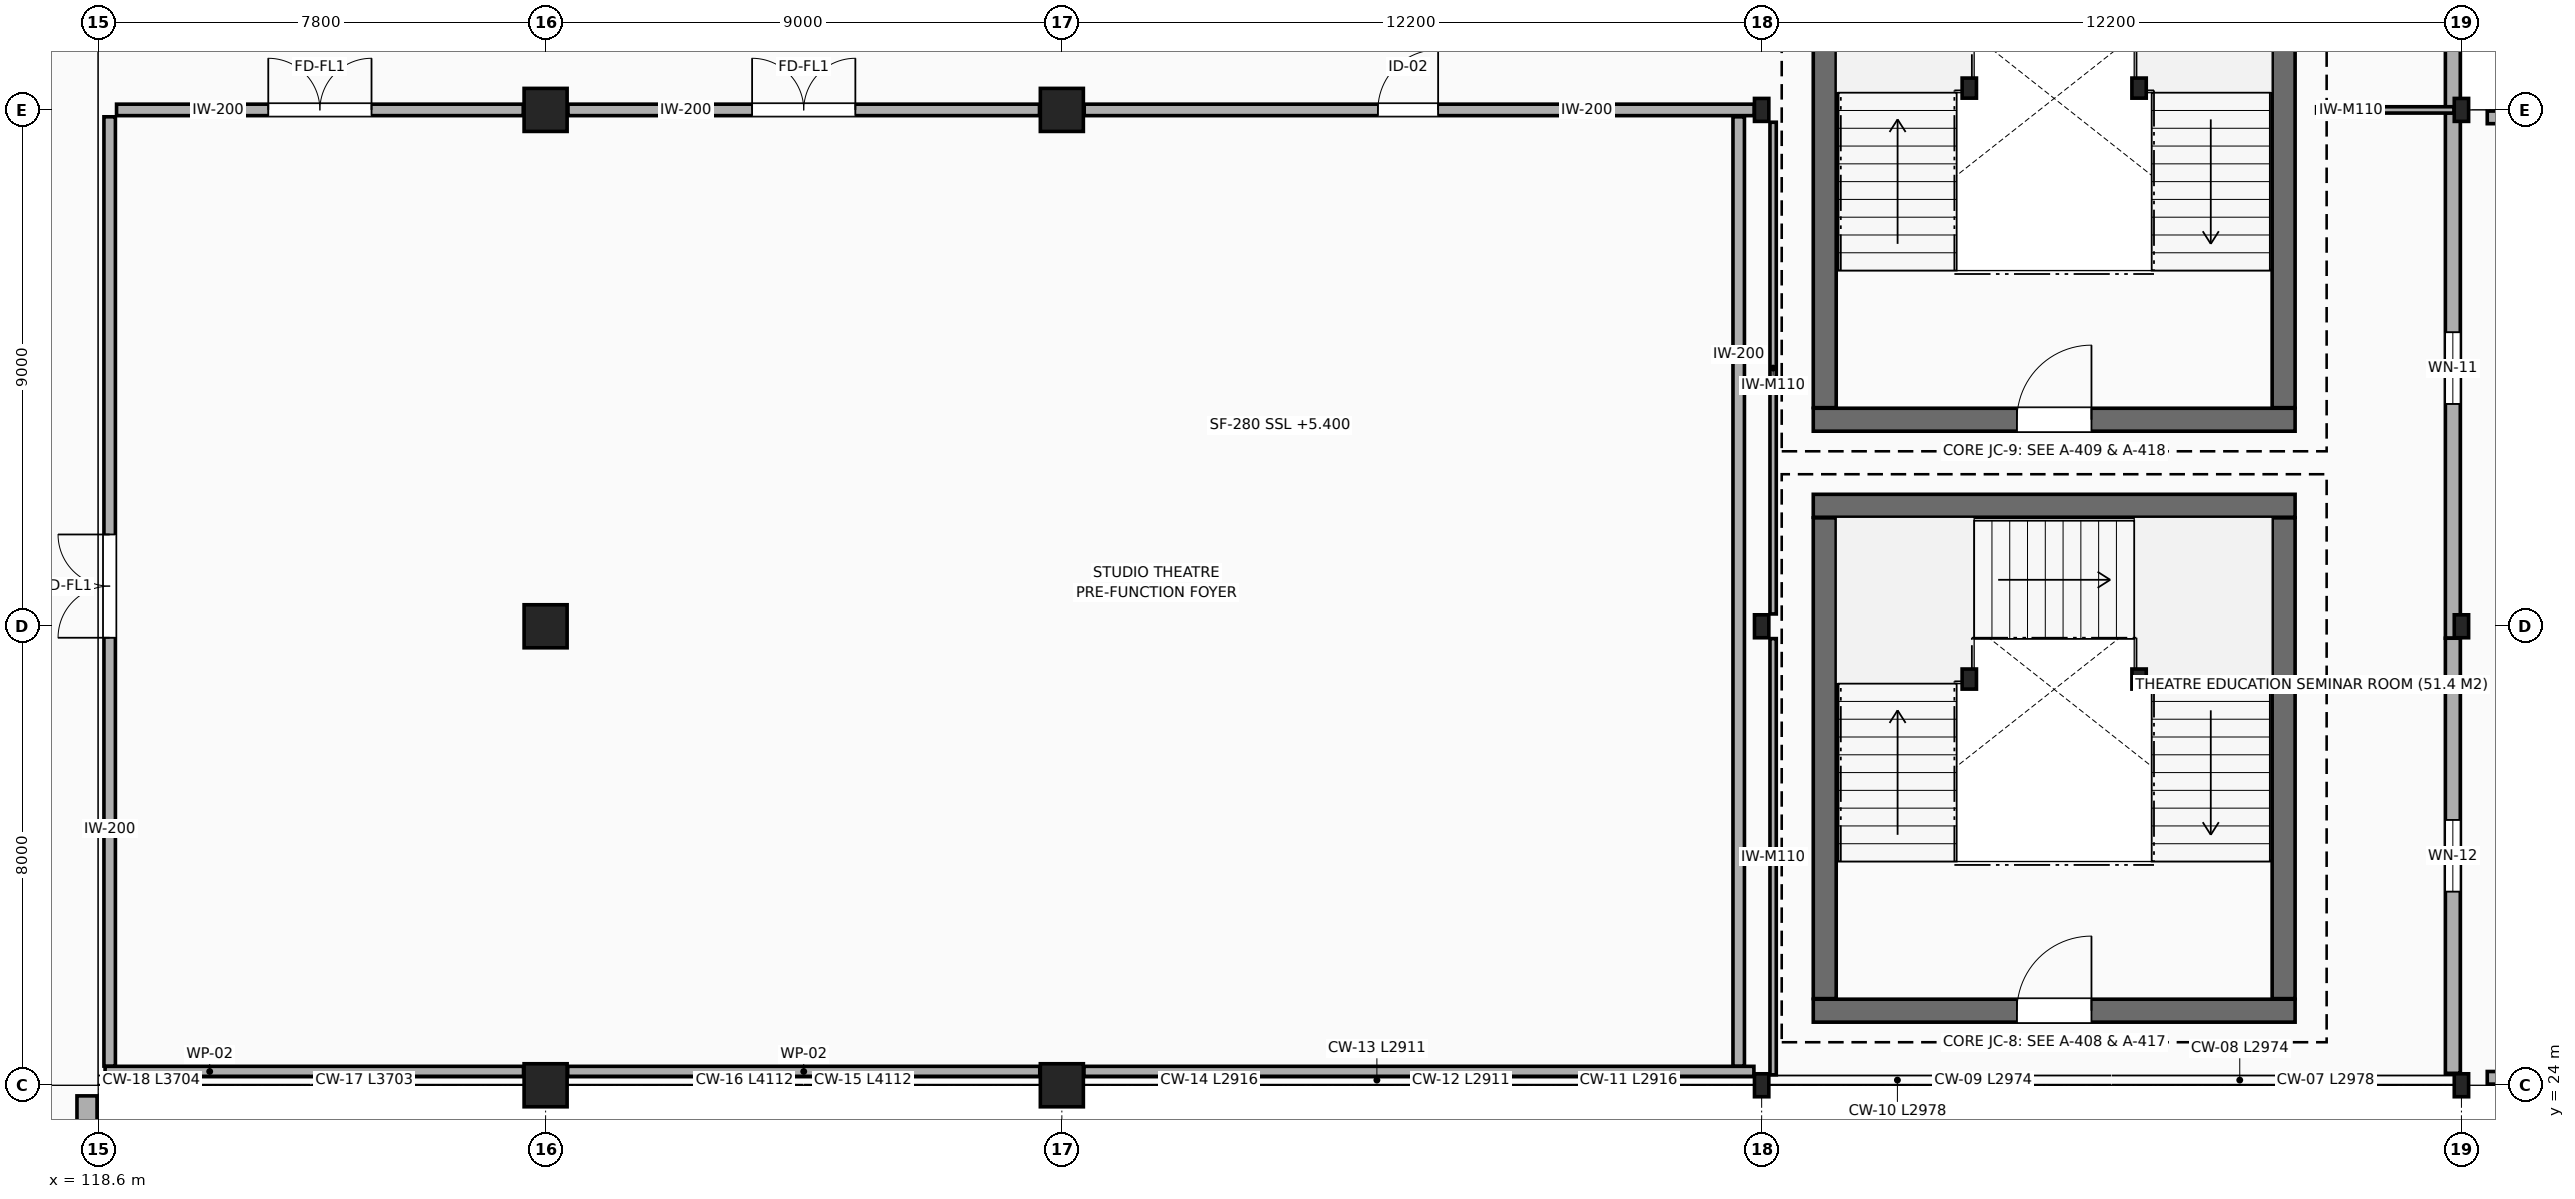
"""IFC4 building model, lengths in metres.
Left out: names, types, materials, properties, quantities, classifications, styles, units other than length and angle.
Written with IfcOpenShell. Run it as: python <this file> out.ifc"""

import sys

from ifc_helpers import new_model, si_unit, direction, frame, frame_2d, origin, origin_2d, place, context, subcontext, project, spatial, rectangle, i_section, extrude, element, fill, save


model = new_model("IFC4")
c1 = context("Model", 3, precision=1e-05, world=origin(), true_north=direction((0.0, 1.0)))
c2 = subcontext(c1, "Body", "Model", "MODEL_VIEW")
j1 = project(units=[si_unit("LENGTHUNIT", "METRE"), si_unit("PLANEANGLEUNIT", "RADIAN")], contexts=[c1])
p1 = place(None, origin())
s1 = spatial("IfcSite", under=j1, at=p1, CompositionType="ELEMENT")
p2 = place(p1, origin())
s2 = spatial("IfcBuilding", under=s1, at=p2, CompositionType="ELEMENT")
p3 = place(p2, frame((0.0, 0.0, 5.4)))
s3 = spatial("IfcBuildingStorey", under=s2, at=p3, CompositionType="ELEMENT", Elevation=5.4)
for number, where, z_axis, x_axis in (
    (1, (126.4, 24.0, 0.0), (0.0, 0.0, 1.0), (1.0, 0.0, 0.0)),
    (2, (126.4, 32.0, 0.0), (0.0, 0.0, 1.0), (1.0, 0.0, 0.0)),
    (3, (126.4, 41.0, 0.0), (0.0, 0.0, 1.0), (1.0, 0.0, 0.0)),
    (4, (135.4, 24.0, 0.0), (0.0, 0.0, 1.0), (1.0, 0.0, 0.0)),
    (5, (135.4, 41.0, 0.0), (0.0, 0.0, 1.0), (1.0, 0.0, 0.0)),
):
    element("IfcColumn", number, at=place(p3, frame(where, z_axis=z_axis, x_axis=x_axis)), inside=s3, PredefinedType="COLUMN", context=c2, shape_type="SweptSolid", body=[
        extrude(rectangle(XDim=0.75, YDim=0.75, at=origin_2d()), origin(), (0.0, 0.0, 1.0), 4.8),
    ])
for number, where, z_axis, x_axis in (
    (6, (147.6, 24.0, 0.0), (0.0, 0.0, 1.0), (1.0, 0.0, 0.0)),
    (7, (147.6, 32.0, 0.0), (0.0, 0.0, 1.0), (1.0, 0.0, 0.0)),
    (8, (147.6, 41.0, 0.0), (0.0, 0.0, 1.0), (1.0, 0.0, 0.0)),
    (9, (159.8, 24.0, 0.0), (0.0, 0.0, 1.0), (1.0, 0.0, 0.0)),
    (10, (159.8, 32.0, 0.0), (0.0, 0.0, 1.0), (1.0, 0.0, 0.0)),
    (11, (159.8, 41.0, 0.0), (0.0, 0.0, 1.0), (1.0, 0.0, 0.0)),
):
    element("IfcColumn", number, at=place(p3, frame(where, z_axis=z_axis, x_axis=x_axis)), inside=s3, PredefinedType="COLUMN", context=c2, shape_type="SweptSolid", body=[
        extrude(i_section(OverallWidth=0.25, OverallDepth=0.4, WebThickness=0.01, FlangeThickness=0.013, FilletRadius=0.014, at=origin_2d()), origin(), (0.0, 0.0, 1.0), 4.8),
    ])
for number, where, z_axis, x_axis in (
    (12, (151.22, 31.08, 0.0), (0.0, 0.0, 1.0), (1.0, 0.0, 0.0)),
    (13, (154.18, 31.08, 0.0), (0.0, 0.0, 1.0), (1.0, 0.0, 0.0)),
    (14, (151.22, 41.38, 0.0), (0.0, 0.0, 1.0), (1.0, 0.0, 0.0)),
    (15, (154.18, 41.38, 0.0), (0.0, 0.0, 1.0), (1.0, 0.0, 0.0)),
):
    element("IfcColumn", number, at=place(p3, frame(where, z_axis=z_axis, x_axis=x_axis)), inside=s3, PredefinedType="COLUMN", context=c2, shape_type="SweptSolid", body=[
        extrude(i_section(OverallWidth=0.25, OverallDepth=0.35, WebThickness=0.01, FlangeThickness=0.012, FilletRadius=0.012, at=origin_2d()), origin(), (0.0, 0.0, 1.0), 4.8),
    ])
p4 = place(p3, frame((159.65, 49.792, 0.0), z_axis=(0.0, 0.0, 1.0), x_axis=(0.0, -1.0, 0.0)))
e16 = element("IfcWall", 16, at=p4, inside=s3, PredefinedType="ELEMENTEDWALL", context=c2, shape_type="SweptSolid", body=[
    extrude(rectangle(XDim=8.74, YDim=0.26, at=frame_2d((4.37, 0.0))), origin(), (0.0, 0.0, 1.0), 3.975),
])
p5 = place(p4, frame((3.667, 0.0, 0.95)))
e17 = element("IfcOpeningElement", 17, at=p5, cuts=e16, PredefinedType="OPENING", context=c2, shape_type="SweptSolid", body=[
    extrude(rectangle(XDim=1.25, YDim=1.5, at=frame_2d((0.625, 0.75))), frame((0.0, 0.14, 0.0), z_axis=(0.0, -1.0, 0.0), x_axis=(1.0, 0.0, 0.0)), (0.0, 0.0, 1.0), 0.28),
])
p6 = place(p3, frame((159.65, 40.948, 0.0), z_axis=(0.0, 0.0, 1.0), x_axis=(0.0, -1.0, 0.0)))
e18 = element("IfcWall", 18, at=p6, inside=s3, PredefinedType="ELEMENTEDWALL", context=c2, shape_type="SweptSolid", body=[
    extrude(rectangle(XDim=9.156, YDim=0.26, at=frame_2d((4.578, 0.0))), origin(), (0.0, 0.0, 1.0), 3.925),
])
p7 = place(p6, frame((3.823, 0.0, 0.95)))
e19 = element("IfcOpeningElement", 19, at=p7, cuts=e18, PredefinedType="OPENING", context=c2, shape_type="SweptSolid", body=[
    extrude(rectangle(XDim=1.25, YDim=1.8, at=frame_2d((0.625, 0.9))), frame((0.0, 0.14, 0.0), z_axis=(0.0, -1.0, 0.0), x_axis=(1.0, 0.0, 0.0)), (0.0, 0.0, 1.0), 0.28),
])
p8 = place(p3, frame((159.65, 31.792, 0.0), z_axis=(0.0, 0.0, 1.0), x_axis=(0.0, -1.0, 0.0)))
e20 = element("IfcWall", 20, at=p8, inside=s3, PredefinedType="ELEMENTEDWALL", context=c2, shape_type="SweptSolid", body=[
    extrude(rectangle(XDim=7.584, YDim=0.26, at=frame_2d((3.792, 0.0))), origin(), (0.0, 0.0, 1.0), 4.225),
])
p9 = place(p8, frame((3.167, 0.0, 0.95)))
e21 = element("IfcOpeningElement", 21, at=p9, cuts=e20, PredefinedType="OPENING", context=c2, shape_type="SweptSolid", body=[
    extrude(rectangle(XDim=1.25, YDim=2.1, at=frame_2d((0.625, 1.05))), frame((0.0, 0.14, 0.0), z_axis=(0.0, -1.0, 0.0), x_axis=(1.0, 0.0, 0.0)), (0.0, 0.0, 1.0), 0.28),
])
p10 = place(p3, frame((147.465, 24.24, 0.0), z_axis=(0.0, 0.0, 1.0), x_axis=(-1.0, 0.0, 0.0)))
e22 = element("IfcWall", 22, at=p10, inside=s3, PredefinedType="PARAPET", context=c2, shape_type="SweptSolid", body=[
    extrude(rectangle(XDim=11.68, YDim=0.18, at=frame_2d((5.84, 0.0))), origin(), (0.0, 0.0, 1.0), 0.88),
])
p11 = place(p3, frame((135.015, 24.24, 0.0), z_axis=(0.0, 0.0, 1.0), x_axis=(-1.0, 0.0, 0.0)))
e23 = element("IfcWall", 23, at=p11, inside=s3, PredefinedType="PARAPET", context=c2, shape_type="SweptSolid", body=[
    extrude(rectangle(XDim=8.23, YDim=0.18, at=frame_2d((4.115, 0.0))), origin(), (0.0, 0.0, 1.0), 0.88),
])
p12 = place(p3, frame((126.015, 24.24, 0.0), z_axis=(0.0, 0.0, 1.0), x_axis=(-1.0, 0.0, 0.0)))
e24 = element("IfcWall", 24, at=p12, inside=s3, PredefinedType="PARAPET", context=c2, shape_type="SweptSolid", body=[
    extrude(rectangle(XDim=7.295, YDim=0.18, at=frame_2d((3.647, 0.0))), origin(), (0.0, 0.0, 1.0), 0.88),
])
p13 = place(p3, frame((118.405, 23.815, 0.0), z_axis=(0.0, 0.0, 1.0), x_axis=(0.0, -1.0, 0.0)))
e25 = element("IfcWall", 25, at=p13, inside=s3, PredefinedType="STANDARD", context=c2, shape_type="SweptSolid", body=[
    extrude(rectangle(XDim=13.63, YDim=0.35, at=frame_2d((6.815, 0.0))), origin(), (0.0, 0.0, 1.0), 3.725),
])
for number, where, z_axis, x_axis in (
    (26, (160.25, 40.87, 0.0), (0.0, 0.0, 1.0), (1.0, 0.0, 0.0)),
    (27, (171.85, 24.13, 0.0), (0.0, 0.0, 1.0), (-1.0, 0.0, 0.0)),
):
    element("IfcWall", number, at=place(p3, frame(where, z_axis=z_axis, x_axis=x_axis)), inside=s3, PredefinedType="PARAPET", context=c2, shape_type="SweptSolid", body=[
        extrude(rectangle(XDim=11.6, YDim=0.22, at=frame_2d((5.8, 0.0))), origin(), (0.0, 0.0, 1.0), 1.15),
    ])
p14 = place(p3, frame((148.5, 25.3, 0.0), z_axis=(0.0, 0.0, 1.0), x_axis=(1.0, 0.0, 0.0)))
e28 = element("IfcWall", 28, at=p14, inside=s3, PredefinedType="SHEAR", context=c2, shape_type="SweptSolid", body=[
    extrude(rectangle(XDim=8.4, YDim=0.4, at=frame_2d((4.2, 0.0))), origin(), (0.0, 0.0, 1.0), 4.54),
])
p15 = place(p14, frame((3.55, 0.0, 0.0)))
e29 = element("IfcOpeningElement", 29, at=p15, cuts=e28, PredefinedType="OPENING", context=c2, shape_type="SweptSolid", body=[
    extrude(rectangle(XDim=1.3, YDim=2.15, at=frame_2d((0.65, 1.075))), frame((0.0, 0.21, 0.0), z_axis=(0.0, -1.0, 0.0), x_axis=(1.0, 0.0, 0.0)), (0.0, 0.0, 1.0), 0.42),
])
p16 = place(p3, frame((156.9, 34.1, 0.0), z_axis=(0.0, 0.0, 1.0), x_axis=(-1.0, 0.0, 0.0)))
e30 = element("IfcWall", 30, at=p16, inside=s3, PredefinedType="SHEAR", context=c2, shape_type="SweptSolid", body=[
    extrude(rectangle(XDim=8.4, YDim=0.4, at=frame_2d((4.2, 0.0))), origin(), (0.0, 0.0, 1.0), 4.54),
])
for number, where, z_axis, x_axis in (
    (31, (156.7, 25.51, 0.0), (0.0, 0.0, 1.0), (0.0, 1.0, 0.0)),
    (32, (148.7, 33.89, 0.0), (0.0, 0.0, 1.0), (0.0, -1.0, 0.0)),
):
    element("IfcWall", number, at=place(p3, frame(where, z_axis=z_axis, x_axis=x_axis)), inside=s3, PredefinedType="SHEAR", context=c2, shape_type="SweptSolid", body=[
        extrude(rectangle(XDim=8.38, YDim=0.4, at=frame_2d((4.19, 0.0))), origin(), (0.0, 0.0, 1.0), 4.54),
    ])
p17 = place(p3, frame((148.5, 35.6, 0.0), z_axis=(0.0, 0.0, 1.0), x_axis=(1.0, 0.0, 0.0)))
e33 = element("IfcWall", 33, at=p17, inside=s3, PredefinedType="SHEAR", context=c2, shape_type="SweptSolid", body=[
    extrude(rectangle(XDim=8.4, YDim=0.4, at=frame_2d((4.2, 0.0))), origin(), (0.0, 0.0, 1.0), 4.54),
])
p18 = place(p17, frame((3.55, 0.0, 0.0)))
e34 = element("IfcOpeningElement", 34, at=p18, cuts=e33, PredefinedType="OPENING", context=c2, shape_type="SweptSolid", body=[
    extrude(rectangle(XDim=1.3, YDim=2.15, at=frame_2d((0.65, 1.075))), frame((0.0, 0.21, 0.0), z_axis=(0.0, -1.0, 0.0), x_axis=(1.0, 0.0, 0.0)), (0.0, 0.0, 1.0), 0.42),
])
for number, where, z_axis, x_axis in (
    (35, (156.7, 35.81, 0.0), (0.0, 0.0, 1.0), (0.0, 1.0, 0.0)),
    (36, (148.7, 44.19, 0.0), (0.0, 0.0, 1.0), (0.0, -1.0, 0.0)),
):
    element("IfcWall", number, at=place(p3, frame(where, z_axis=z_axis, x_axis=x_axis)), inside=s3, PredefinedType="SHEAR", context=c2, shape_type="SweptSolid", body=[
        extrude(rectangle(XDim=8.38, YDim=0.4, at=frame_2d((4.19, 0.0))), origin(), (0.0, 0.0, 1.0), 4.54),
    ])
p19 = place(p3, frame((118.92, 41.0, 0.0), z_axis=(0.0, 0.0, 1.0), x_axis=(1.0, 0.0, 0.0)))
e37 = element("IfcWall", 37, at=p19, inside=s3, PredefinedType="PARTITIONING", context=c2, shape_type="SweptSolid", body=[
    extrude(rectangle(XDim=7.09, YDim=0.2, at=frame_2d((3.545, 0.0))), origin(), (0.0, 0.0, 1.0), 4.53),
])
p20 = place(p19, frame((2.645, 0.0, 0.0)))
e38 = element("IfcOpeningElement", 38, at=p20, cuts=e37, PredefinedType="OPENING", context=c2, shape_type="SweptSolid", body=[
    extrude(rectangle(XDim=1.8, YDim=2.15, at=frame_2d((0.9, 1.075))), frame((0.0, 0.11, 0.0), z_axis=(0.0, -1.0, 0.0), x_axis=(1.0, 0.0, 0.0)), (0.0, 0.0, 1.0), 0.22),
])
p21 = place(p3, frame((126.79, 41.0, 0.0), z_axis=(0.0, 0.0, 1.0), x_axis=(1.0, 0.0, 0.0)))
e39 = element("IfcWall", 39, at=p21, inside=s3, PredefinedType="PARTITIONING", context=c2, shape_type="SweptSolid", body=[
    extrude(rectangle(XDim=8.22, YDim=0.2, at=frame_2d((4.11, 0.0))), origin(), (0.0, 0.0, 1.0), 3.89),
])
p22 = place(p21, frame((3.21, 0.0, 0.0)))
e40 = element("IfcOpeningElement", 40, at=p22, cuts=e39, PredefinedType="OPENING", context=c2, shape_type="SweptSolid", body=[
    extrude(rectangle(XDim=1.8, YDim=2.15, at=frame_2d((0.9, 1.075))), frame((0.0, 0.11, 0.0), z_axis=(0.0, -1.0, 0.0), x_axis=(1.0, 0.0, 0.0)), (0.0, 0.0, 1.0), 0.22),
])
p23 = place(p3, frame((135.79, 41.0, 0.0), z_axis=(0.0, 0.0, 1.0), x_axis=(1.0, 0.0, 0.0)))
e41 = element("IfcWall", 41, at=p23, inside=s3, PredefinedType="PARTITIONING", context=c2, shape_type="SweptSolid", body=[
    extrude(rectangle(XDim=11.681, YDim=0.2, at=frame_2d((5.84, 0.0))), origin(), (0.0, 0.0, 1.0), 3.89),
])
p24 = place(p23, frame((5.12, 0.0, 0.0)))
e42 = element("IfcOpeningElement", 42, at=p24, cuts=e41, PredefinedType="OPENING", context=c2, shape_type="SweptSolid", body=[
    extrude(rectangle(XDim=1.05, YDim=2.15, at=frame_2d((0.525, 1.075))), frame((0.0, 0.11, 0.0), z_axis=(0.0, -1.0, 0.0), x_axis=(1.0, 0.0, 0.0)), (0.0, 0.0, 1.0), 0.22),
])
p25 = place(p3, frame((147.2, 40.88, 0.0), z_axis=(0.0, 0.0, 1.0), x_axis=(0.0, -1.0, 0.0)))
e43 = element("IfcWall", 43, at=p25, inside=s3, PredefinedType="PARTITIONING", context=c2, shape_type="SweptSolid", body=[
    extrude(rectangle(XDim=16.546, YDim=0.2, at=frame_2d((8.273, 0.0))), origin(), (0.0, 0.0, 1.0), 3.89),
])
p26 = place(p3, frame((118.8, 24.334, 0.0), z_axis=(0.0, 0.0, 1.0), x_axis=(0.0, 1.0, 0.0)))
e44 = element("IfcWall", 44, at=p26, inside=s3, PredefinedType="PARTITIONING", context=c2, shape_type="SweptSolid", body=[
    extrude(rectangle(XDim=16.546, YDim=0.2, at=frame_2d((8.273, 0.0))), origin(), (0.0, 0.0, 1.0), 3.72),
])
p27 = place(p26, frame((7.466, 0.0, 0.0)))
e45 = element("IfcOpeningElement", 45, at=p27, cuts=e44, PredefinedType="OPENING", context=c2, shape_type="SweptSolid", body=[
    extrude(rectangle(XDim=1.8, YDim=2.15, at=frame_2d((0.9, 1.075))), frame((0.0, 0.11, 0.0), z_axis=(0.0, -1.0, 0.0), x_axis=(1.0, 0.0, 0.0)), (0.0, 0.0, 1.0), 0.22),
])
p28 = place(p3, frame((147.8, 24.182, 0.0), z_axis=(0.0, 0.0, 1.0), x_axis=(0.0, 1.0, 0.0)))
e46 = element("IfcWall", 46, at=p28, inside=s3, PredefinedType="MOVABLE", context=c2, shape_type="SweptSolid", body=[
    extrude(rectangle(XDim=7.603, YDim=0.11, at=frame_2d((3.802, 0.0))), origin(), (0.0, 0.0, 1.0), 3.89),
])
p29 = place(p3, frame((147.8, 32.215, 0.0), z_axis=(0.0, 0.0, 1.0), x_axis=(0.0, 1.0, 0.0)))
e47 = element("IfcWall", 47, at=p29, inside=s3, PredefinedType="MOVABLE", context=c2, shape_type="SweptSolid", body=[
    extrude(rectangle(XDim=8.57, YDim=0.11, at=frame_2d((4.285, 0.0))), origin(), (0.0, 0.0, 1.0), 3.89),
])
p30 = place(p3, frame((157.275, 41.0, 0.0), z_axis=(0.0, 0.0, 1.0), x_axis=(1.0, 0.0, 0.0)))
e48 = element("IfcWall", 48, at=p30, inside=s3, PredefinedType="MOVABLE", context=c2, shape_type="SweptSolid", body=[
    extrude(rectangle(XDim=2.396, YDim=0.11, at=frame_2d((1.198, 0.0))), origin(), (0.0, 0.0, 1.0), 4.53),
])
p31 = place(p7, origin())
e49 = element("IfcWindow", 49, at=p31, inside=s3, PartitioningType="SINGLE_PANEL", PredefinedType="WINDOW", context=c2, shape_type="SweptSolid", body=[
    extrude(rectangle(XDim=1.25, YDim=1.8, at=frame_2d((0.625, 0.9))), frame((0.0, 0.03, 0.0), z_axis=(0.0, -1.0, 0.0), x_axis=(1.0, 0.0, 0.0)), (0.0, 0.0, 1.0), 0.06),
])
fill(e19, e49)
p32 = place(p9, origin())
e50 = element("IfcWindow", 50, at=p32, inside=s3, PartitioningType="SINGLE_PANEL", PredefinedType="WINDOW", context=c2, shape_type="SweptSolid", body=[
    extrude(rectangle(XDim=1.25, YDim=2.1, at=frame_2d((0.625, 1.05))), frame((0.0, 0.03, 0.0), z_axis=(0.0, -1.0, 0.0), x_axis=(1.0, 0.0, 0.0)), (0.0, 0.0, 1.0), 0.06),
])
fill(e21, e50)
p33 = place(p15, origin())
e51 = element("IfcDoor", 51, at=p33, inside=s3, OperationType="SINGLE_SWING_RIGHT", PredefinedType="DOOR", context=c2, shape_type="SweptSolid", body=[
    extrude(rectangle(XDim=1.3, YDim=2.15, at=frame_2d((0.65, 1.075))), frame((0.0, 0.025, 0.0), z_axis=(0.0, -1.0, 0.0), x_axis=(1.0, 0.0, 0.0)), (0.0, 0.0, 1.0), 0.05),
])
fill(e29, e51)
p34 = place(p18, origin())
e52 = element("IfcDoor", 52, at=p34, inside=s3, OperationType="SINGLE_SWING_RIGHT", PredefinedType="DOOR", context=c2, shape_type="SweptSolid", body=[
    extrude(rectangle(XDim=1.3, YDim=2.15, at=frame_2d((0.65, 1.075))), frame((0.0, 0.025, 0.0), z_axis=(0.0, -1.0, 0.0), x_axis=(1.0, 0.0, 0.0)), (0.0, 0.0, 1.0), 0.05),
])
fill(e34, e52)
p35 = place(p24, origin())
e53 = element("IfcDoor", 53, at=p35, inside=s3, OperationType="SINGLE_SWING_RIGHT", PredefinedType="DOOR", context=c2, shape_type="SweptSolid", body=[
    extrude(rectangle(XDim=1.05, YDim=2.15, at=frame_2d((0.525, 1.075))), frame((0.0, 0.025, 0.0), z_axis=(0.0, -1.0, 0.0), x_axis=(1.0, 0.0, 0.0)), (0.0, 0.0, 1.0), 0.05),
])
fill(e42, e53)
p36 = place(p20, origin())
e54 = element("IfcDoor", 54, at=p36, inside=s3, OperationType="DOUBLE_DOOR_SINGLE_SWING", PredefinedType="DOOR", context=c2, shape_type="SweptSolid", body=[
    extrude(rectangle(XDim=1.8, YDim=2.15, at=frame_2d((0.9, 1.075))), frame((0.0, 0.025, 0.0), z_axis=(0.0, -1.0, 0.0), x_axis=(1.0, 0.0, 0.0)), (0.0, 0.0, 1.0), 0.05),
])
fill(e38, e54)
p37 = place(p22, origin())
e55 = element("IfcDoor", 55, at=p37, inside=s3, OperationType="DOUBLE_DOOR_SINGLE_SWING", PredefinedType="DOOR", context=c2, shape_type="SweptSolid", body=[
    extrude(rectangle(XDim=1.8, YDim=2.15, at=frame_2d((0.9, 1.075))), frame((0.0, 0.025, 0.0), z_axis=(0.0, -1.0, 0.0), x_axis=(1.0, 0.0, 0.0)), (0.0, 0.0, 1.0), 0.05),
])
fill(e40, e55)
p38 = place(p27, origin())
e56 = element("IfcDoor", 56, at=p38, inside=s3, OperationType="DOUBLE_DOOR_SINGLE_SWING", PredefinedType="DOOR", context=c2, shape_type="SweptSolid", body=[
    extrude(rectangle(XDim=1.8, YDim=2.15, at=frame_2d((0.9, 1.075))), frame((0.0, 0.025, 0.0), z_axis=(0.0, -1.0, 0.0), x_axis=(1.0, 0.0, 0.0)), (0.0, 0.0, 1.0), 0.05),
])
fill(e45, e56)
save(model, sys.argv[1])
